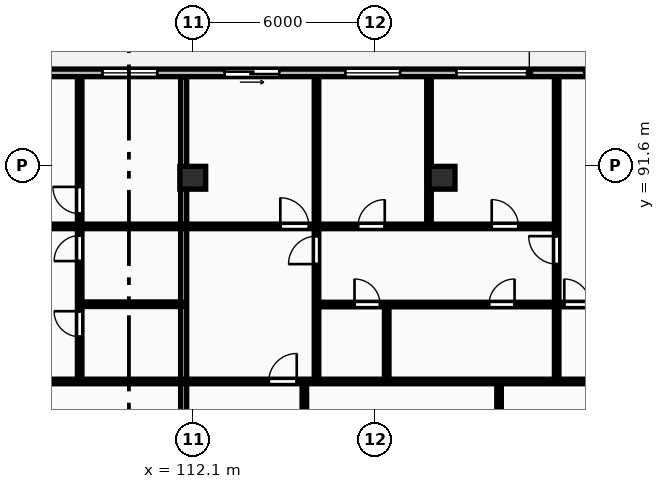
"""IFC4 building model, lengths in metres.
Left out: names, types, materials, properties, quantities, classifications, styles, units other than length and angle.
Written with IfcOpenShell. Run it as: python <this file> out.ifc"""

import sys

from ifc_helpers import new_model, si_unit, direction, frame, frame_2d, origin, origin_2d, place, context, subcontext, project, spatial, rectangle, extrude, element, fill, save


model = new_model("IFC4")
c1 = context("Model", 3, precision=1e-05, world=origin(), true_north=direction((0.0, 1.0)))
c2 = subcontext(c1, "Body", "Model", "MODEL_VIEW")
j1 = project(units=[si_unit("LENGTHUNIT", "METRE"), si_unit("PLANEANGLEUNIT", "RADIAN")], contexts=[c1])
p1 = place(None, origin())
s1 = spatial("IfcSite", under=j1, at=p1, CompositionType="ELEMENT")
p2 = place(p1, origin())
s2 = spatial("IfcBuilding", under=s1, at=p2, CompositionType="ELEMENT")
p3 = place(p2, frame((0.0, 0.0, 207.6)))
s3 = spatial("IfcBuildingStorey", under=s2, at=p3, CompositionType="ELEMENT", Elevation=207.6)
for number, where, z_axis, x_axis in (
    (1, (112.1, 91.2, 0.0), (0.0, 0.0, 1.0), (1.0, 0.0, 0.0)),
    (2, (120.3, 91.2, 0.0), (0.0, 0.0, 1.0), (1.0, 0.0, 0.0)),
):
    element("IfcColumn", number, at=place(p3, frame(where, z_axis=z_axis, x_axis=x_axis)), inside=s3, PredefinedType="COLUMN", context=c2, shape_type="SweptSolid", body=[
        extrude(rectangle(XDim=0.85, YDim=0.75, at=origin_2d()), origin(), (0.0, 0.0, 1.0), 3.25),
    ])
p4 = place(p3, frame((128.4, 94.65, 0.0), z_axis=(0.0, 0.0, 1.0), x_axis=(-1.0, 0.0, 0.0)))
e3 = element("IfcWall", 3, at=p4, inside=s3, PredefinedType="STANDARD", context=c2, shape_type="SweptSolid", body=[
    extrude(rectangle(XDim=68.6, YDim=0.25, at=frame_2d((34.3, 0.0))), origin(), (0.0, 0.0, 1.0), 2.97),
])
p5 = place(p4, frame((62.6, 0.0, 0.0)))
e4 = element("IfcOpeningElement", 4, at=p5, cuts=e3, PredefinedType="OPENING", context=c2, shape_type="SweptSolid", body=[
    extrude(rectangle(XDim=1.8, YDim=2.2, at=frame_2d((0.9, 1.1))), frame((0.0, 0.135, 0.0), z_axis=(0.0, -1.0, 0.0), x_axis=(1.0, 0.0, 0.0)), (0.0, 0.0, 1.0), 0.27),
])
p6 = place(p4, frame((56.252, 0.0, 0.85)))
e5 = element("IfcOpeningElement", 5, at=p6, cuts=e3, PredefinedType="OPENING", context=c2, shape_type="SweptSolid", body=[
    extrude(rectangle(XDim=1.8, YDim=1.8, at=frame_2d((0.9, 0.9))), frame((0.0, 0.135, 0.0), z_axis=(0.0, -1.0, 0.0), x_axis=(1.0, 0.0, 0.0)), (0.0, 0.0, 1.0), 0.27),
])
p7 = place(p4, frame((49.882, 0.0, 0.0)))
e6 = element("IfcOpeningElement", 6, at=p7, cuts=e3, PredefinedType="OPENING", context=c2, shape_type="SweptSolid", body=[
    extrude(rectangle(XDim=1.8, YDim=2.2, at=frame_2d((0.9, 1.1))), frame((0.0, 0.135, 0.0), z_axis=(0.0, -1.0, 0.0), x_axis=(1.0, 0.0, 0.0)), (0.0, 0.0, 1.0), 0.27),
])
p8 = place(p4, frame((43.47, 0.0, 0.85)))
e7 = element("IfcOpeningElement", 7, at=p8, cuts=e3, PredefinedType="OPENING", context=c2, shape_type="SweptSolid", body=[
    extrude(rectangle(XDim=1.8, YDim=1.8, at=frame_2d((0.9, 0.9))), frame((0.0, 0.135, 0.0), z_axis=(0.0, -1.0, 0.0), x_axis=(1.0, 0.0, 0.0)), (0.0, 0.0, 1.0), 0.27),
])
p9 = place(p4, frame((36.75, 0.0, 0.0)))
e8 = element("IfcOpeningElement", 8, at=p9, cuts=e3, PredefinedType="OPENING", context=c2, shape_type="SweptSolid", body=[
    extrude(rectangle(XDim=1.8, YDim=2.2, at=frame_2d((0.9, 1.1))), frame((0.0, 0.135, 0.0), z_axis=(0.0, -1.0, 0.0), x_axis=(1.0, 0.0, 0.0)), (0.0, 0.0, 1.0), 0.27),
])
p10 = place(p4, frame((30.402, 0.0, 0.85)))
e9 = element("IfcOpeningElement", 9, at=p10, cuts=e3, PredefinedType="OPENING", context=c2, shape_type="SweptSolid", body=[
    extrude(rectangle(XDim=1.8, YDim=1.8, at=frame_2d((0.9, 0.9))), frame((0.0, 0.135, 0.0), z_axis=(0.0, -1.0, 0.0), x_axis=(1.0, 0.0, 0.0)), (0.0, 0.0, 1.0), 0.27),
])
p11 = place(p4, frame((23.882, 0.0, 0.0)))
e10 = element("IfcOpeningElement", 10, at=p11, cuts=e3, PredefinedType="OPENING", context=c2, shape_type="SweptSolid", body=[
    extrude(rectangle(XDim=1.8, YDim=2.2, at=frame_2d((0.9, 1.1))), frame((0.0, 0.135, 0.0), z_axis=(0.0, -1.0, 0.0), x_axis=(1.0, 0.0, 0.0)), (0.0, 0.0, 1.0), 0.27),
])
p12 = place(p4, frame((17.47, 0.0, 0.85)))
e11 = element("IfcOpeningElement", 11, at=p12, cuts=e3, PredefinedType="OPENING", context=c2, shape_type="SweptSolid", body=[
    extrude(rectangle(XDim=1.8, YDim=1.8, at=frame_2d((0.9, 0.9))), frame((0.0, 0.135, 0.0), z_axis=(0.0, -1.0, 0.0), x_axis=(1.0, 0.0, 0.0)), (0.0, 0.0, 1.0), 0.27),
])
p13 = place(p4, frame((9.48, 0.0, 0.85)))
e12 = element("IfcOpeningElement", 12, at=p13, cuts=e3, PredefinedType="OPENING", context=c2, shape_type="SweptSolid", body=[
    extrude(rectangle(XDim=1.8, YDim=1.8, at=frame_2d((0.9, 0.9))), frame((0.0, 0.135, 0.0), z_axis=(0.0, -1.0, 0.0), x_axis=(1.0, 0.0, 0.0)), (0.0, 0.0, 1.0), 0.27),
])
p14 = place(p4, frame((5.23, 0.0, 0.85)))
e13 = element("IfcOpeningElement", 13, at=p14, cuts=e3, PredefinedType="OPENING", context=c2, shape_type="SweptSolid", body=[
    extrude(rectangle(XDim=2.4, YDim=1.9, at=frame_2d((1.2, 0.95))), frame((0.0, 0.135, 0.0), z_axis=(0.0, -1.0, 0.0), x_axis=(1.0, 0.0, 0.0)), (0.0, 0.0, 1.0), 0.27),
])
p15 = place(p4, frame((13.455, 0.0, 0.0)))
e14 = element("IfcOpeningElement", 14, at=p15, cuts=e3, PredefinedType="OPENING", context=c2, shape_type="SweptSolid", body=[
    extrude(rectangle(XDim=1.8, YDim=2.2, at=frame_2d((0.9, 1.1))), frame((0.0, 0.135, 0.0), z_axis=(0.0, -1.0, 0.0), x_axis=(1.0, 0.0, 0.0)), (0.0, 0.0, 1.0), 0.27),
])
p16 = place(p4, frame((1.025, 0.0, 0.85)))
e15 = element("IfcOpeningElement", 15, at=p16, cuts=e3, PredefinedType="OPENING", context=c2, shape_type="SweptSolid", body=[
    extrude(rectangle(XDim=2.4, YDim=1.9, at=frame_2d((1.2, 0.95))), frame((0.0, 0.135, 0.0), z_axis=(0.0, -1.0, 0.0), x_axis=(1.0, 0.0, 0.0)), (0.0, 0.0, 1.0), 0.27),
])
p17 = place(p3, frame((111.8, 70.18, 0.0), z_axis=(0.0, 0.0, 1.0), x_axis=(0.0, 1.0, 0.0)))
e16 = element("IfcWall", 16, at=p17, inside=s3, PredefinedType="PARTITIONING", context=c2, shape_type="SweptSolid", body=[
    extrude(rectangle(XDim=24.32, YDim=0.2, at=frame_2d((12.16, 0.0))), origin(), (0.0, 0.0, 1.0), 2.97),
])
p18 = place(p3, frame((108.44, 87.04, 0.0), z_axis=(0.0, 0.0, 1.0), x_axis=(1.0, 0.0, 0.0)))
e17 = element("IfcWall", 17, at=p18, inside=s3, PredefinedType="PARTITIONING", context=c2, shape_type="SweptSolid", body=[
    extrude(rectangle(XDim=3.28, YDim=0.15, at=frame_2d((1.64, 0.0))), origin(), (0.0, 0.0, 1.0), 2.97),
])
p19 = place(p3, frame((108.38, 84.54, 0.0), z_axis=(0.0, 0.0, 1.0), x_axis=(0.0, 1.0, 0.0)))
e18 = element("IfcWall", 18, at=p19, inside=s3, PredefinedType="PARTITIONING", context=c2, shape_type="SweptSolid", body=[
    extrude(rectangle(XDim=9.96, YDim=0.15, at=frame_2d((4.98, 0.0))), origin(), (0.0, 0.0, 1.0), 2.97),
])
p20 = place(p19, frame((1.43, 0.0, 0.0)))
e19 = element("IfcOpeningElement", 19, at=p20, cuts=e18, PredefinedType="OPENING", context=c2, shape_type="SweptSolid", body=[
    extrude(rectangle(XDim=0.84, YDim=2.04, at=frame_2d((0.42, 1.02))), frame((0.0, 0.085, 0.0), z_axis=(0.0, -1.0, 0.0), x_axis=(1.0, 0.0, 0.0)), (0.0, 0.0, 1.0), 0.17),
])
p21 = place(p19, frame((3.92, 0.0, 0.0)))
e20 = element("IfcOpeningElement", 20, at=p21, cuts=e18, PredefinedType="OPENING", context=c2, shape_type="SweptSolid", body=[
    extrude(rectangle(XDim=0.84, YDim=2.04, at=frame_2d((0.42, 1.02))), frame((0.0, 0.085, 0.0), z_axis=(0.0, -1.0, 0.0), x_axis=(1.0, 0.0, 0.0)), (0.0, 0.0, 1.0), 0.17),
])
p22 = place(p19, frame((5.48, 0.0, 0.0)))
e21 = element("IfcOpeningElement", 21, at=p22, cuts=e18, PredefinedType="OPENING", context=c2, shape_type="SweptSolid", body=[
    extrude(rectangle(XDim=0.88, YDim=2.06, at=frame_2d((0.44, 1.03))), frame((0.0, 0.085, 0.0), z_axis=(0.0, -1.0, 0.0), x_axis=(1.0, 0.0, 0.0)), (0.0, 0.0, 1.0), 0.17),
])
p23 = place(p3, frame((98.816, 84.5, 0.0), z_axis=(0.0, 0.0, 1.0), x_axis=(1.0, 0.0, 0.0)))
e22 = element("IfcWall", 22, at=p23, inside=s3, PredefinedType="PARTITIONING", context=c2, shape_type="SweptSolid", body=[
    extrude(rectangle(XDim=12.904, YDim=0.15, at=frame_2d((6.452, 0.0))), origin(), (0.0, 0.0, 1.0), 2.97),
])
p24 = place(p23, frame((2.72, 0.0, 0.0)))
e23 = element("IfcOpeningElement", 23, at=p24, cuts=e22, PredefinedType="OPENING", context=c2, shape_type="SweptSolid", body=[
    extrude(rectangle(XDim=0.92, YDim=2.08, at=frame_2d((0.46, 1.04))), frame((0.0, 0.085, 0.0), z_axis=(0.0, -1.0, 0.0), x_axis=(1.0, 0.0, 0.0)), (0.0, 0.0, 1.0), 0.17),
])
p25 = place(p3, frame((98.816, 89.6, 0.0), z_axis=(0.0, 0.0, 1.0), x_axis=(1.0, 0.0, 0.0)))
e24 = element("IfcWall", 24, at=p25, inside=s3, PredefinedType="PARTITIONING", context=c2, shape_type="SweptSolid", body=[
    extrude(rectangle(XDim=12.904, YDim=0.15, at=frame_2d((6.452, 0.0))), origin(), (0.0, 0.0, 1.0), 2.97),
])
p26 = place(p25, frame((5.982, 0.0, 0.0)))
e25 = element("IfcOpeningElement", 25, at=p26, cuts=e24, PredefinedType="OPENING", context=c2, shape_type="SweptSolid", body=[
    extrude(rectangle(XDim=0.94, YDim=2.1, at=frame_2d((0.47, 1.05))), frame((0.0, 0.085, 0.0), z_axis=(0.0, -1.0, 0.0), x_axis=(1.0, 0.0, 0.0)), (0.0, 0.0, 1.0), 0.17),
])
p27 = place(p3, frame((122.175, 70.16, 0.0), z_axis=(0.0, 0.0, 1.0), x_axis=(0.0, 1.0, 0.0)))
e26 = element("IfcWall", 26, at=p27, inside=s3, PredefinedType="PARTITIONING", context=c2, shape_type="SweptSolid", body=[
    extrude(rectangle(XDim=14.3, YDim=0.15, at=frame_2d((7.15, 0.0))), origin(), (0.0, 0.0, 1.0), 2.97),
])
p28 = place(p27, frame((6.24, 0.0, 0.0)))
e27 = element("IfcOpeningElement", 27, at=p28, cuts=e26, PredefinedType="OPENING", context=c2, shape_type="SweptSolid", body=[
    extrude(rectangle(XDim=0.84, YDim=2.04, at=frame_2d((0.42, 1.02))), frame((0.0, 0.085, 0.0), z_axis=(0.0, -1.0, 0.0), x_axis=(1.0, 0.0, 0.0)), (0.0, 0.0, 1.0), 0.17),
])
p29 = place(p27, frame((11.094, 0.0, 0.0)))
e28 = element("IfcOpeningElement", 28, at=p29, cuts=e26, PredefinedType="OPENING", context=c2, shape_type="SweptSolid", body=[
    extrude(rectangle(XDim=0.88, YDim=2.06, at=frame_2d((0.44, 1.03))), frame((0.0, 0.085, 0.0), z_axis=(0.0, -1.0, 0.0), x_axis=(1.0, 0.0, 0.0)), (0.0, 0.0, 1.0), 0.17),
])
p30 = place(p3, frame((115.77, 70.16, 0.0), z_axis=(0.0, 0.0, 1.0), x_axis=(0.0, 1.0, 0.0)))
e29 = element("IfcWall", 29, at=p30, inside=s3, PredefinedType="PARTITIONING", context=c2, shape_type="SweptSolid", body=[
    extrude(rectangle(XDim=14.3, YDim=0.15, at=frame_2d((7.15, 0.0))), origin(), (0.0, 0.0, 1.0), 2.97),
])
p31 = place(p30, frame((6.2, 0.0, 0.0)))
e30 = element("IfcOpeningElement", 30, at=p31, cuts=e29, PredefinedType="OPENING", context=c2, shape_type="SweptSolid", body=[
    extrude(rectangle(XDim=0.88, YDim=2.06, at=frame_2d((0.44, 1.03))), frame((0.0, 0.085, 0.0), z_axis=(0.0, -1.0, 0.0), x_axis=(1.0, 0.0, 0.0)), (0.0, 0.0, 1.0), 0.17),
])
p32 = place(p3, frame((118.48, 84.54, 0.0), z_axis=(0.0, 0.0, 1.0), x_axis=(0.0, 1.0, 0.0)))
e31 = element("IfcWall", 31, at=p32, inside=s3, PredefinedType="PARTITIONING", context=c2, shape_type="SweptSolid", body=[
    extrude(rectangle(XDim=2.47, YDim=0.15, at=frame_2d((1.235, 0.0))), origin(), (0.0, 0.0, 1.0), 2.97),
])
p33 = place(p3, frame((119.87, 89.68, 0.0), z_axis=(0.0, 0.0, 1.0), x_axis=(0.0, 1.0, 0.0)))
e32 = element("IfcWall", 32, at=p33, inside=s3, PredefinedType="PARTITIONING", context=c2, shape_type="SweptSolid", body=[
    extrude(rectangle(XDim=4.82, YDim=0.15, at=frame_2d((2.41, 0.0))), origin(), (0.0, 0.0, 1.0), 2.97),
])
p34 = place(p3, frame((116.17, 84.54, 0.0), z_axis=(0.0, 0.0, 1.0), x_axis=(0.0, 1.0, 0.0)))
e33 = element("IfcWall", 33, at=p34, inside=s3, PredefinedType="PARTITIONING", context=c2, shape_type="SweptSolid", body=[
    extrude(rectangle(XDim=9.96, YDim=0.15, at=frame_2d((4.98, 0.0))), origin(), (0.0, 0.0, 1.0), 2.97),
])
p35 = place(p34, frame((3.82, 0.0, 0.0)))
e34 = element("IfcOpeningElement", 34, at=p35, cuts=e33, PredefinedType="OPENING", context=c2, shape_type="SweptSolid", body=[
    extrude(rectangle(XDim=0.92, YDim=2.08, at=frame_2d((0.46, 1.04))), frame((0.0, 0.085, 0.0), z_axis=(0.0, -1.0, 0.0), x_axis=(1.0, 0.0, 0.0)), (0.0, 0.0, 1.0), 0.17),
])
p36 = place(p3, frame((124.07, 84.54, 0.0), z_axis=(0.0, 0.0, 1.0), x_axis=(0.0, 1.0, 0.0)))
e35 = element("IfcWall", 35, at=p36, inside=s3, PredefinedType="PARTITIONING", context=c2, shape_type="SweptSolid", body=[
    extrude(rectangle(XDim=2.47, YDim=0.15, at=frame_2d((1.235, 0.0))), origin(), (0.0, 0.0, 1.0), 2.97),
])
p37 = place(p3, frame((124.07, 87.05, 0.0), z_axis=(0.0, 0.0, 1.0), x_axis=(0.0, 1.0, 0.0)))
e36 = element("IfcWall", 36, at=p37, inside=s3, PredefinedType="PARTITIONING", context=c2, shape_type="SweptSolid", body=[
    extrude(rectangle(XDim=7.45, YDim=0.15, at=frame_2d((3.725, 0.0))), origin(), (0.0, 0.0, 1.0), 2.97),
])
p38 = place(p37, frame((1.31, 0.0, 0.0)))
e37 = element("IfcOpeningElement", 37, at=p38, cuts=e36, PredefinedType="OPENING", context=c2, shape_type="SweptSolid", body=[
    extrude(rectangle(XDim=0.92, YDim=2.08, at=frame_2d((0.46, 1.04))), frame((0.0, 0.085, 0.0), z_axis=(0.0, -1.0, 0.0), x_axis=(1.0, 0.0, 0.0)), (0.0, 0.0, 1.0), 0.17),
])
p39 = place(p3, frame((116.21, 87.03, 0.0), z_axis=(0.0, 0.0, 1.0), x_axis=(1.0, 0.0, 0.0)))
e38 = element("IfcWall", 38, at=p39, inside=s3, PredefinedType="PARTITIONING", context=c2, shape_type="SweptSolid", body=[
    extrude(rectangle(XDim=12.11, YDim=0.15, at=frame_2d((6.055, 0.0))), origin(), (0.0, 0.0, 1.0), 2.97),
])
p40 = place(p39, frame((1.21, 0.0, 0.0)))
e39 = element("IfcOpeningElement", 39, at=p40, cuts=e38, PredefinedType="OPENING", context=c2, shape_type="SweptSolid", body=[
    extrude(rectangle(XDim=0.84, YDim=2.04, at=frame_2d((0.42, 1.02))), frame((0.0, 0.085, 0.0), z_axis=(0.0, -1.0, 0.0), x_axis=(1.0, 0.0, 0.0)), (0.0, 0.0, 1.0), 0.17),
])
p41 = place(p39, frame((5.635, 0.0, 0.0)))
e40 = element("IfcOpeningElement", 40, at=p41, cuts=e38, PredefinedType="OPENING", context=c2, shape_type="SweptSolid", body=[
    extrude(rectangle(XDim=0.84, YDim=2.04, at=frame_2d((0.42, 1.02))), frame((0.0, 0.085, 0.0), z_axis=(0.0, -1.0, 0.0), x_axis=(1.0, 0.0, 0.0)), (0.0, 0.0, 1.0), 0.17),
])
p42 = place(p39, frame((8.11, 0.0, 0.0)))
e41 = element("IfcOpeningElement", 41, at=p42, cuts=e38, PredefinedType="OPENING", context=c2, shape_type="SweptSolid", body=[
    extrude(rectangle(XDim=0.84, YDim=2.04, at=frame_2d((0.42, 1.02))), frame((0.0, 0.085, 0.0), z_axis=(0.0, -1.0, 0.0), x_axis=(1.0, 0.0, 0.0)), (0.0, 0.0, 1.0), 0.17),
])
p43 = place(p3, frame((111.88, 84.5, 0.0), z_axis=(0.0, 0.0, 1.0), x_axis=(1.0, 0.0, 0.0)))
e42 = element("IfcWall", 42, at=p43, inside=s3, PredefinedType="PARTITIONING", context=c2, shape_type="SweptSolid", body=[
    extrude(rectangle(XDim=16.44, YDim=0.15, at=frame_2d((8.22, 0.0))), origin(), (0.0, 0.0, 1.0), 2.97),
])
p44 = place(p43, frame((2.72, 0.0, 0.0)))
e43 = element("IfcOpeningElement", 43, at=p44, cuts=e42, PredefinedType="OPENING", context=c2, shape_type="SweptSolid", body=[
    extrude(rectangle(XDim=0.92, YDim=2.08, at=frame_2d((0.46, 1.04))), frame((0.0, 0.085, 0.0), z_axis=(0.0, -1.0, 0.0), x_axis=(1.0, 0.0, 0.0)), (0.0, 0.0, 1.0), 0.17),
])
p45 = place(p3, frame((111.88, 89.6, 0.0), z_axis=(0.0, 0.0, 1.0), x_axis=(1.0, 0.0, 0.0)))
e44 = element("IfcWall", 44, at=p45, inside=s3, PredefinedType="PARTITIONING", context=c2, shape_type="SweptSolid", body=[
    extrude(rectangle(XDim=12.19, YDim=0.15, at=frame_2d((6.095, 0.0))), origin(), (0.0, 0.0, 1.0), 2.97),
])
p46 = place(p45, frame((3.1, 0.0, 0.0)))
e45 = element("IfcOpeningElement", 45, at=p46, cuts=e44, PredefinedType="OPENING", context=c2, shape_type="SweptSolid", body=[
    extrude(rectangle(XDim=0.94, YDim=2.1, at=frame_2d((0.47, 1.05))), frame((0.0, 0.085, 0.0), z_axis=(0.0, -1.0, 0.0), x_axis=(1.0, 0.0, 0.0)), (0.0, 0.0, 1.0), 0.17),
])
p47 = place(p45, frame((5.655, 0.0, 0.0)))
e46 = element("IfcOpeningElement", 46, at=p47, cuts=e44, PredefinedType="OPENING", context=c2, shape_type="SweptSolid", body=[
    extrude(rectangle(XDim=0.88, YDim=2.06, at=frame_2d((0.44, 1.03))), frame((0.0, 0.085, 0.0), z_axis=(0.0, -1.0, 0.0), x_axis=(1.0, 0.0, 0.0)), (0.0, 0.0, 1.0), 0.17),
])
p48 = place(p45, frame((10.053, 0.0, 0.0)))
e47 = element("IfcOpeningElement", 47, at=p48, cuts=e44, PredefinedType="OPENING", context=c2, shape_type="SweptSolid", body=[
    extrude(rectangle(XDim=0.88, YDim=2.06, at=frame_2d((0.44, 1.03))), frame((0.0, 0.085, 0.0), z_axis=(0.0, -1.0, 0.0), x_axis=(1.0, 0.0, 0.0)), (0.0, 0.0, 1.0), 0.17),
])
p49 = place(p12, origin())
e48 = element("IfcWindow", 48, at=p49, inside=s3, PartitioningType="SINGLE_PANEL", PredefinedType="WINDOW", context=c2, shape_type="SweptSolid", body=[
    extrude(rectangle(XDim=1.8, YDim=1.8, at=frame_2d((0.9, 0.9))), frame((0.0, 0.03, 0.0), z_axis=(0.0, -1.0, 0.0), x_axis=(1.0, 0.0, 0.0)), (0.0, 0.0, 1.0), 0.06),
])
fill(e11, e48)
p50 = place(p13, origin())
e49 = element("IfcWindow", 49, at=p50, inside=s3, PartitioningType="SINGLE_PANEL", PredefinedType="WINDOW", context=c2, shape_type="SweptSolid", body=[
    extrude(rectangle(XDim=1.8, YDim=1.8, at=frame_2d((0.9, 0.9))), frame((0.0, 0.03, 0.0), z_axis=(0.0, -1.0, 0.0), x_axis=(1.0, 0.0, 0.0)), (0.0, 0.0, 1.0), 0.06),
])
fill(e12, e49)
p51 = place(p14, origin())
e50 = element("IfcWindow", 50, at=p51, inside=s3, PartitioningType="DOUBLE_PANEL_VERTICAL", PredefinedType="WINDOW", context=c2, shape_type="SweptSolid", body=[
    extrude(rectangle(XDim=2.4, YDim=1.9, at=frame_2d((1.2, 0.95))), frame((0.0, 0.03, 0.0), z_axis=(0.0, -1.0, 0.0), x_axis=(1.0, 0.0, 0.0)), (0.0, 0.0, 1.0), 0.06),
])
fill(e13, e50)
p52 = place(p15, origin())
e51 = element("IfcDoor", 51, at=p52, inside=s3, OperationType="SLIDING_TO_LEFT", PredefinedType="DOOR", context=c2, shape_type="SweptSolid", body=[
    extrude(rectangle(XDim=1.8, YDim=2.2, at=frame_2d((0.9, 1.1))), frame((0.0, 0.025, 0.0), z_axis=(0.0, -1.0, 0.0), x_axis=(1.0, 0.0, 0.0)), (0.0, 0.0, 1.0), 0.05),
])
fill(e14, e51)
p53 = place(p16, origin())
e52 = element("IfcWindow", 52, at=p53, inside=s3, PartitioningType="DOUBLE_PANEL_VERTICAL", PredefinedType="WINDOW", context=c2, shape_type="SweptSolid", body=[
    extrude(rectangle(XDim=2.4, YDim=1.9, at=frame_2d((1.2, 0.95))), frame((0.0, 0.03, 0.0), z_axis=(0.0, -1.0, 0.0), x_axis=(1.0, 0.0, 0.0)), (0.0, 0.0, 1.0), 0.06),
])
fill(e15, e52)
p54 = place(p20, origin())
e53 = element("IfcDoor", 53, at=p54, inside=s3, OperationType="SINGLE_SWING_RIGHT", PredefinedType="DOOR", context=c2, shape_type="SweptSolid", body=[
    extrude(rectangle(XDim=0.84, YDim=2.04, at=frame_2d((0.42, 1.02))), frame((0.0, 0.025, 0.0), z_axis=(0.0, -1.0, 0.0), x_axis=(1.0, 0.0, 0.0)), (0.0, 0.0, 1.0), 0.05),
])
fill(e19, e53)
p55 = place(p21, origin())
e54 = element("IfcDoor", 54, at=p55, inside=s3, OperationType="SINGLE_SWING_LEFT", PredefinedType="DOOR", context=c2, shape_type="SweptSolid", body=[
    extrude(rectangle(XDim=0.84, YDim=2.04, at=frame_2d((0.42, 1.02))), frame((0.0, 0.025, 0.0), z_axis=(0.0, -1.0, 0.0), x_axis=(1.0, 0.0, 0.0)), (0.0, 0.0, 1.0), 0.05),
])
fill(e20, e54)
p56 = place(p22, origin())
e55 = element("IfcDoor", 55, at=p56, inside=s3, OperationType="SINGLE_SWING_RIGHT", PredefinedType="DOOR", context=c2, shape_type="SweptSolid", body=[
    extrude(rectangle(XDim=0.88, YDim=2.06, at=frame_2d((0.44, 1.03))), frame((0.0, 0.025, 0.0), z_axis=(0.0, -1.0, 0.0), x_axis=(1.0, 0.0, 0.0)), (0.0, 0.0, 1.0), 0.05),
])
fill(e21, e55)
p57 = place(p35, origin())
e56 = element("IfcDoor", 56, at=p57, inside=s3, OperationType="SINGLE_SWING_LEFT", PredefinedType="DOOR", context=c2, shape_type="SweptSolid", body=[
    extrude(rectangle(XDim=0.92, YDim=2.08, at=frame_2d((0.46, 1.04))), frame((0.0, 0.025, 0.0), z_axis=(0.0, -1.0, 0.0), x_axis=(1.0, 0.0, 0.0)), (0.0, 0.0, 1.0), 0.05),
])
fill(e34, e56)
p58 = place(p38, origin())
e57 = element("IfcDoor", 57, at=p58, inside=s3, OperationType="SINGLE_SWING_RIGHT", PredefinedType="DOOR", context=c2, shape_type="SweptSolid", body=[
    extrude(rectangle(XDim=0.92, YDim=2.08, at=frame_2d((0.46, 1.04))), frame((0.0, 0.025, 0.0), z_axis=(0.0, -1.0, 0.0), x_axis=(1.0, 0.0, 0.0)), (0.0, 0.0, 1.0), 0.05),
])
fill(e37, e57)
p59 = place(p40, origin())
e58 = element("IfcDoor", 58, at=p59, inside=s3, OperationType="SINGLE_SWING_LEFT", PredefinedType="DOOR", context=c2, shape_type="SweptSolid", body=[
    extrude(rectangle(XDim=0.84, YDim=2.04, at=frame_2d((0.42, 1.02))), frame((0.0, 0.025, 0.0), z_axis=(0.0, -1.0, 0.0), x_axis=(1.0, 0.0, 0.0)), (0.0, 0.0, 1.0), 0.05),
])
fill(e39, e58)
p60 = place(p41, origin())
e59 = element("IfcDoor", 59, at=p60, inside=s3, OperationType="SINGLE_SWING_RIGHT", PredefinedType="DOOR", context=c2, shape_type="SweptSolid", body=[
    extrude(rectangle(XDim=0.84, YDim=2.04, at=frame_2d((0.42, 1.02))), frame((0.0, 0.025, 0.0), z_axis=(0.0, -1.0, 0.0), x_axis=(1.0, 0.0, 0.0)), (0.0, 0.0, 1.0), 0.05),
])
fill(e40, e59)
p61 = place(p42, origin())
e60 = element("IfcDoor", 60, at=p61, inside=s3, OperationType="SINGLE_SWING_LEFT", PredefinedType="DOOR", context=c2, shape_type="SweptSolid", body=[
    extrude(rectangle(XDim=0.84, YDim=2.04, at=frame_2d((0.42, 1.02))), frame((0.0, 0.025, 0.0), z_axis=(0.0, -1.0, 0.0), x_axis=(1.0, 0.0, 0.0)), (0.0, 0.0, 1.0), 0.05),
])
fill(e41, e60)
p62 = place(p44, origin())
e61 = element("IfcDoor", 61, at=p62, inside=s3, OperationType="SINGLE_SWING_RIGHT", PredefinedType="DOOR", context=c2, shape_type="SweptSolid", body=[
    extrude(rectangle(XDim=0.92, YDim=2.08, at=frame_2d((0.46, 1.04))), frame((0.0, 0.025, 0.0), z_axis=(0.0, -1.0, 0.0), x_axis=(1.0, 0.0, 0.0)), (0.0, 0.0, 1.0), 0.05),
])
fill(e43, e61)
p63 = place(p46, origin())
e62 = element("IfcDoor", 62, at=p63, inside=s3, OperationType="SINGLE_SWING_LEFT", PredefinedType="DOOR", context=c2, shape_type="SweptSolid", body=[
    extrude(rectangle(XDim=0.94, YDim=2.1, at=frame_2d((0.47, 1.05))), frame((0.0, 0.025, 0.0), z_axis=(0.0, -1.0, 0.0), x_axis=(1.0, 0.0, 0.0)), (0.0, 0.0, 1.0), 0.05),
])
fill(e45, e62)
p64 = place(p47, origin())
e63 = element("IfcDoor", 63, at=p64, inside=s3, OperationType="SINGLE_SWING_RIGHT", PredefinedType="DOOR", context=c2, shape_type="SweptSolid", body=[
    extrude(rectangle(XDim=0.88, YDim=2.06, at=frame_2d((0.44, 1.03))), frame((0.0, 0.025, 0.0), z_axis=(0.0, -1.0, 0.0), x_axis=(1.0, 0.0, 0.0)), (0.0, 0.0, 1.0), 0.05),
])
fill(e46, e63)
p65 = place(p48, origin())
e64 = element("IfcDoor", 64, at=p65, inside=s3, OperationType="SINGLE_SWING_LEFT", PredefinedType="DOOR", context=c2, shape_type="SweptSolid", body=[
    extrude(rectangle(XDim=0.88, YDim=2.06, at=frame_2d((0.44, 1.03))), frame((0.0, 0.025, 0.0), z_axis=(0.0, -1.0, 0.0), x_axis=(1.0, 0.0, 0.0)), (0.0, 0.0, 1.0), 0.05),
])
fill(e47, e64)
save(model, sys.argv[1])
